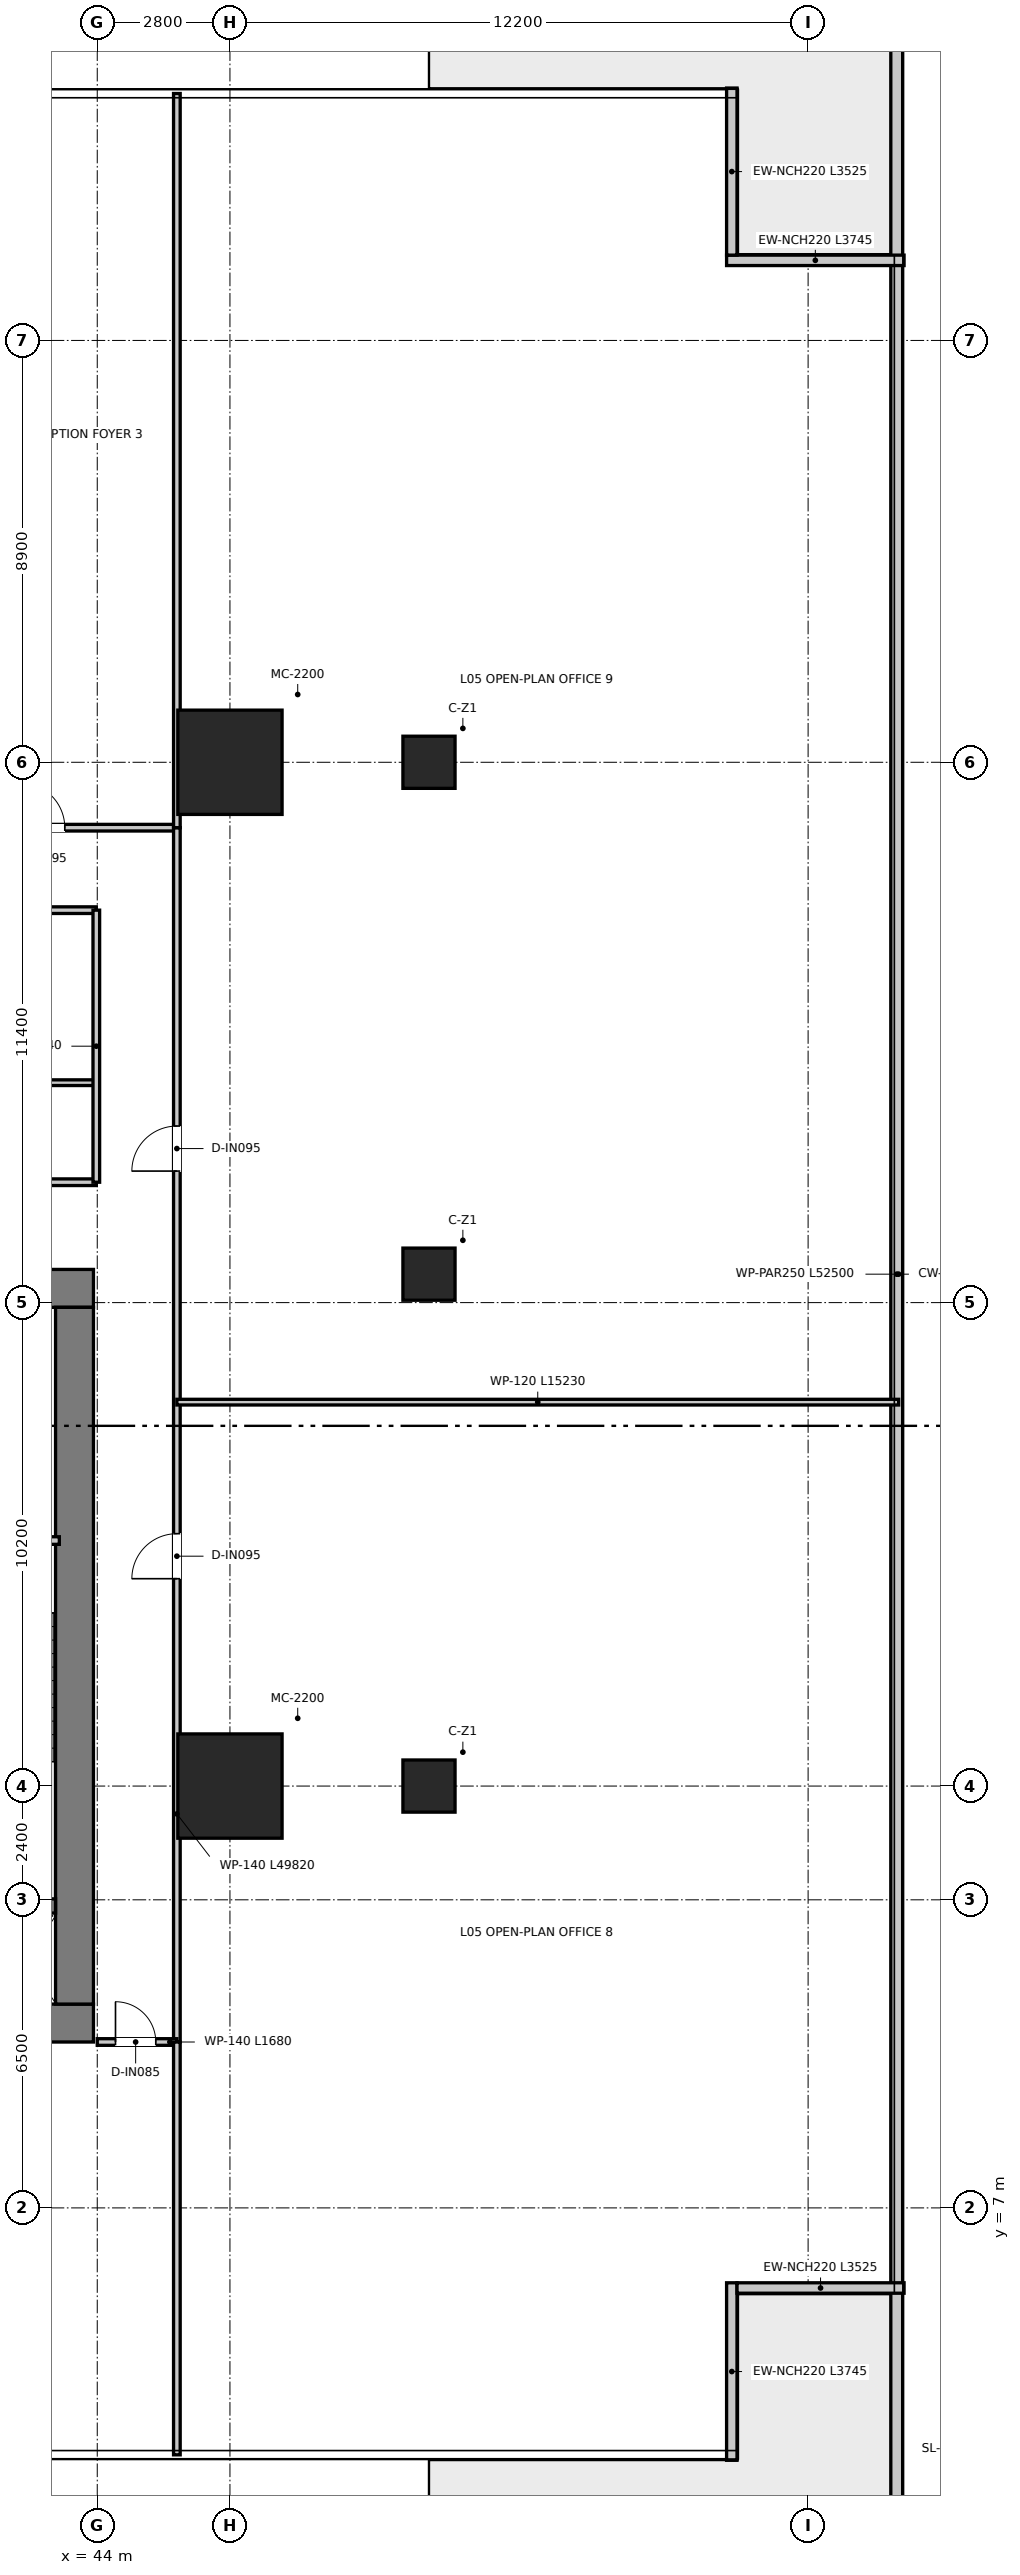
"""IFC4 building model, lengths in metres.
Left out: names, types, materials, properties, quantities, classifications, styles, units other than length and angle.
Written with IfcOpenShell. Run it as: python <this file> out.ifc"""

import sys

from ifc_helpers import new_model, si_unit, direction, frame, frame_2d, origin, origin_2d, place, context, subcontext, project, spatial, rectangle, extrude, source, transform, mapped, element, fill, save


model = new_model("IFC4")
c1 = context("Model", 3, precision=1e-05, world=origin(), true_north=direction((0.0, 1.0)))
c2 = subcontext(c1, "Body", "Model", "MODEL_VIEW")
j1 = project(units=[si_unit("LENGTHUNIT", "METRE"), si_unit("PLANEANGLEUNIT", "RADIAN")], contexts=[c1])
p1 = place(None, origin())
s1 = spatial("IfcSite", under=j1, at=p1, CompositionType="ELEMENT")
p2 = place(p1, origin())
s2 = spatial("IfcBuilding", under=s1, at=p2, CompositionType="ELEMENT")
p3 = place(p2, frame((0.0, 0.0, 25.0)))
s3 = spatial("IfcBuildingStorey", under=s2, at=p3, CompositionType="ELEMENT", Elevation=25.0)
p4 = place(p3, frame((28.08, 10.9, 0.0), z_axis=(0.0, 0.0, 1.0), x_axis=(1.0, 0.0, 0.0)))
e1 = element("IfcWall", 1, at=p4, inside=s3, PredefinedType="SHEAR", context=c2, shape_type="SweptSolid", body=[
    extrude(rectangle(XDim=15.84, YDim=0.8, at=frame_2d((7.92, 0.0))), origin(), (0.0, 0.0, 1.0), 3.95),
])
p5 = place(p3, frame((28.08, 26.4, 0.0), z_axis=(0.0, 0.0, 1.0), x_axis=(1.0, 0.0, 0.0)))
e2 = element("IfcWall", 2, at=p5, inside=s3, PredefinedType="SHEAR", context=c2, shape_type="SweptSolid", body=[
    extrude(rectangle(XDim=15.84, YDim=0.8, at=frame_2d((7.92, 0.0))), origin(), (0.0, 0.0, 1.0), 3.95),
])
p6 = place(p5, frame((7.22, 0.0, 0.0)))
e3 = element("IfcOpeningElement", 3, at=p6, cuts=e2, PredefinedType="OPENING", context=c2, shape_type="SweptSolid", body=[
    extrude(rectangle(XDim=1.4, YDim=2.2, at=frame_2d((0.7, 1.1))), frame((0.0, 0.41, 0.0), z_axis=(0.0, -1.0, 0.0), x_axis=(1.0, 0.0, 0.0)), (0.0, 0.0, 1.0), 0.82),
])
p7 = place(p5, frame((1.775, 0.0, 0.0)))
e4 = element("IfcOpeningElement", 4, at=p7, cuts=e2, PredefinedType="OPENING", context=c2, shape_type="SweptSolid", body=[
    extrude(rectangle(XDim=1.05, YDim=2.1, at=frame_2d((0.525, 1.05))), frame((0.0, 0.41, 0.0), z_axis=(0.0, -1.0, 0.0), x_axis=(1.0, 0.0, 0.0)), (0.0, 0.0, 1.0), 0.82),
])
p8 = place(p5, frame((13.015, 0.0, 0.0)))
e5 = element("IfcOpeningElement", 5, at=p8, cuts=e2, PredefinedType="OPENING", context=c2, shape_type="SweptSolid", body=[
    extrude(rectangle(XDim=1.05, YDim=2.1, at=frame_2d((0.525, 1.05))), frame((0.0, 0.41, 0.0), z_axis=(0.0, -1.0, 0.0), x_axis=(1.0, 0.0, 0.0)), (0.0, 0.0, 1.0), 0.82),
])
p9 = place(p3, frame((43.52, 11.3, 0.0), z_axis=(0.0, 0.0, 1.0), x_axis=(0.0, 1.0, 0.0)))
e6 = element("IfcWall", 6, at=p9, inside=s3, PredefinedType="SHEAR", context=c2, shape_type="SweptSolid", body=[
    extrude(rectangle(XDim=14.7, YDim=0.8, at=frame_2d((7.35, 0.0))), origin(), (0.0, 0.0, 1.0), 3.95),
])
p10 = place(p3, frame((40.02, 13.37, 0.0), z_axis=(0.0, 0.0, 1.0), x_axis=(1.0, 0.0, 0.0)))
e7 = element("IfcWall", 7, at=p10, inside=s3, PredefinedType="SHEAR", context=c2, shape_type="SweptSolid", body=[
    extrude(rectangle(XDim=3.1, YDim=0.3, at=frame_2d((1.55, 0.0))), origin(), (0.0, 0.0, 1.0), 3.95),
])
m1 = source(origin(), c2, "Body", "SweptSolid", [
    extrude(rectangle(XDim=2.2, YDim=2.2, at=origin_2d()), origin(), (0.0, 0.0, 1.0), 3.95),
])
for number, where, z_axis, x_axis in (
    (8, (46.8, 15.9, 0.0), (0.0, 0.0, 1.0), (1.0, 0.0, 0.0)),
    (9, (46.8, 37.5, 0.0), (0.0, 0.0, 1.0), (1.0, 0.0, 0.0)),
):
    element("IfcColumn", number, at=place(p3, frame(where, z_axis=z_axis, x_axis=x_axis)), inside=s3, PredefinedType="USERDEFINED", context=c2, shape_type="MappedRepresentation", body=[
        mapped(m1, transform((0.0, 0.0, 0.0), x_axis=(1.0, 0.0, 0.0), y_axis=(0.0, 1.0, 0.0), z_axis=(0.0, 0.0, 1.0), scale=1.0)),
    ])
m2 = source(origin(), c2, "Body", "SweptSolid", [
    extrude(rectangle(XDim=1.1, YDim=1.1, at=origin_2d()), origin(), (0.0, 0.0, 1.0), 3.95),
])
for number, where, z_axis, x_axis in (
    (10, (51.0, 37.5, 0.0), (0.0, 0.0, 1.0), (1.0, 0.0, 0.0)),
    (11, (51.0, 26.7, 0.0), (0.0, 0.0, 1.0), (1.0, 0.0, 0.0)),
    (12, (51.0, 15.9, 0.0), (0.0, 0.0, 1.0), (1.0, 0.0, 0.0)),
):
    element("IfcColumn", number, at=place(p3, frame(where, z_axis=z_axis, x_axis=x_axis)), inside=s3, PredefinedType="COLUMN", context=c2, shape_type="MappedRepresentation", body=[
        mapped(m2, transform((0.0, 0.0, 0.0), x_axis=(1.0, 0.0, 0.0), y_axis=(0.0, 1.0, 0.0), z_axis=(0.0, 0.0, 1.0), scale=1.0)),
    ])
p11 = place(p3, frame((60.87, 0.45, 0.0), z_axis=(0.0, 0.0, 1.0), x_axis=(0.0, 1.0, 0.0)))
e13 = element("IfcWall", 13, at=p11, inside=s3, PredefinedType="PARAPET", context=c2, shape_type="SweptSolid", body=[
    extrude(rectangle(XDim=52.5, YDim=0.25, at=frame_2d((26.25, 0.0))), origin(), (0.0, 0.0, 1.0), 1.2),
])
p12 = place(p3, frame((57.39, 1.675, 0.0), z_axis=(0.0, 0.0, 1.0), x_axis=(0.0, 1.0, 0.0)))
e14 = element("IfcWall", 14, at=p12, inside=s3, PredefinedType="ELEMENTEDWALL", context=c2, shape_type="SweptSolid", body=[
    extrude(rectangle(XDim=3.745, YDim=0.22, at=frame_2d((1.873, 0.0))), origin(), (0.0, 0.0, 1.0), 3.67),
])
p13 = place(p3, frame((57.5, 5.31, 0.0), z_axis=(0.0, 0.0, 1.0), x_axis=(1.0, 0.0, 0.0)))
e15 = element("IfcWall", 15, at=p13, inside=s3, PredefinedType="ELEMENTEDWALL", context=c2, shape_type="SweptSolid", body=[
    extrude(rectangle(XDim=3.525, YDim=0.22, at=frame_2d((1.762, 0.0))), origin(), (0.0, 0.0, 1.0), 3.67),
])
p14 = place(p3, frame((61.025, 48.09, 0.0), z_axis=(0.0, 0.0, 1.0), x_axis=(-1.0, 0.0, 0.0)))
e16 = element("IfcWall", 16, at=p14, inside=s3, PredefinedType="ELEMENTEDWALL", context=c2, shape_type="SweptSolid", body=[
    extrude(rectangle(XDim=3.745, YDim=0.22, at=frame_2d((1.873, 0.0))), origin(), (0.0, 0.0, 1.0), 3.67),
])
p15 = place(p3, frame((57.39, 48.2, 0.0), z_axis=(0.0, 0.0, 1.0), x_axis=(0.0, 1.0, 0.0)))
e17 = element("IfcWall", 17, at=p15, inside=s3, PredefinedType="ELEMENTEDWALL", context=c2, shape_type="SweptSolid", body=[
    extrude(rectangle(XDim=3.525, YDim=0.22, at=frame_2d((1.763, 0.0))), origin(), (0.0, 0.0, 1.0), 3.67),
])
p16 = place(p3, frame((40.04, 21.08, 0.0), z_axis=(0.0, 0.0, 1.0), x_axis=(1.0, 0.0, 0.0)))
e18 = element("IfcWall", 18, at=p16, inside=s3, PredefinedType="PARTITIONING", context=c2, shape_type="SweptSolid", body=[
    extrude(rectangle(XDim=3.16, YDim=0.16, at=frame_2d((1.58, 0.0))), origin(), (0.0, 0.0, 1.0), 3.67),
])
p17 = place(p16, frame((1.055, 0.0, 0.0)))
e19 = element("IfcOpeningElement", 19, at=p17, cuts=e18, PredefinedType="OPENING", context=c2, shape_type="SweptSolid", body=[
    extrude(rectangle(XDim=1.05, YDim=2.1, at=frame_2d((0.525, 1.05))), frame((0.0, 0.09, 0.0), z_axis=(0.0, -1.0, 0.0), x_axis=(1.0, 0.0, 0.0)), (0.0, 0.0, 1.0), 0.18),
])
p18 = place(p3, frame((28.02, 28.64, 0.0), z_axis=(0.0, 0.0, 1.0), x_axis=(1.0, 0.0, 0.0)))
e20 = element("IfcWall", 20, at=p18, inside=s3, PredefinedType="PARTITIONING", context=c2, shape_type="SweptSolid", body=[
    extrude(rectangle(XDim=15.96, YDim=0.14, at=frame_2d((7.98, 0.0))), origin(), (0.0, 0.0, 1.0), 3.08),
])
p19 = place(p18, frame((7.455, 0.0, 0.0)))
e21 = element("IfcOpeningElement", 21, at=p19, cuts=e20, PredefinedType="OPENING", context=c2, shape_type="SweptSolid", body=[
    extrude(rectangle(XDim=1.05, YDim=2.15, at=frame_2d((0.525, 1.075))), frame((0.0, 0.08, 0.0), z_axis=(0.0, -1.0, 0.0), x_axis=(1.0, 0.0, 0.0)), (0.0, 0.0, 1.0), 0.16),
])
p20 = place(p3, frame((28.02, 30.74, 0.0), z_axis=(0.0, 0.0, 1.0), x_axis=(1.0, 0.0, 0.0)))
e22 = element("IfcWall", 22, at=p20, inside=s3, PredefinedType="PARTITIONING", context=c2, shape_type="SweptSolid", body=[
    extrude(rectangle(XDim=15.96, YDim=0.12, at=frame_2d((7.98, 0.0))), origin(), (0.0, 0.0, 1.0), 3.08),
])
p21 = place(p3, frame((28.02, 34.38, 0.0), z_axis=(0.0, 0.0, 1.0), x_axis=(1.0, 0.0, 0.0)))
e23 = element("IfcWall", 23, at=p21, inside=s3, PredefinedType="PARTITIONING", context=c2, shape_type="SweptSolid", body=[
    extrude(rectangle(XDim=15.96, YDim=0.14, at=frame_2d((7.98, 0.0))), origin(), (0.0, 0.0, 1.0), 3.08),
])
p22 = place(p21, frame((1.13, 0.0, 0.0)))
e24 = element("IfcOpeningElement", 24, at=p22, cuts=e23, PredefinedType="OPENING", context=c2, shape_type="SweptSolid", body=[
    extrude(rectangle(XDim=0.9, YDim=2.1, at=frame_2d((0.45, 1.05))), frame((0.0, 0.08, 0.0), z_axis=(0.0, -1.0, 0.0), x_axis=(1.0, 0.0, 0.0)), (0.0, 0.0, 1.0), 0.16),
])
p23 = place(p21, frame((4.33, 0.0, 0.0)))
e25 = element("IfcOpeningElement", 25, at=p23, cuts=e23, PredefinedType="OPENING", context=c2, shape_type="SweptSolid", body=[
    extrude(rectangle(XDim=0.9, YDim=2.1, at=frame_2d((0.45, 1.05))), frame((0.0, 0.08, 0.0), z_axis=(0.0, -1.0, 0.0), x_axis=(1.0, 0.0, 0.0)), (0.0, 0.0, 1.0), 0.16),
])
p24 = place(p21, frame((7.355, 0.0, 0.0)))
e26 = element("IfcOpeningElement", 26, at=p24, cuts=e23, PredefinedType="OPENING", context=c2, shape_type="SweptSolid", body=[
    extrude(rectangle(XDim=0.95, YDim=2.1, at=frame_2d((0.475, 1.05))), frame((0.0, 0.08, 0.0), z_axis=(0.0, -1.0, 0.0), x_axis=(1.0, 0.0, 0.0)), (0.0, 0.0, 1.0), 0.16),
])
p25 = place(p21, frame((12.23, 0.0, 0.0)))
e27 = element("IfcOpeningElement", 27, at=p25, cuts=e23, PredefinedType="OPENING", context=c2, shape_type="SweptSolid", body=[
    extrude(rectangle(XDim=0.95, YDim=2.1, at=frame_2d((0.475, 1.05))), frame((0.0, 0.08, 0.0), z_axis=(0.0, -1.0, 0.0), x_axis=(1.0, 0.0, 0.0)), (0.0, 0.0, 1.0), 0.16),
])
p26 = place(p3, frame((43.98, 28.64, 0.0), z_axis=(0.0, 0.0, 1.0), x_axis=(0.0, 1.0, 0.0)))
e28 = element("IfcWall", 28, at=p26, inside=s3, PredefinedType="PARTITIONING", context=c2, shape_type="SweptSolid", body=[
    extrude(rectangle(XDim=5.74, YDim=0.14, at=frame_2d((2.87, 0.0))), origin(), (0.0, 0.0, 1.0), 3.22),
])
p27 = place(p3, frame((26.32, 36.12, 0.0), z_axis=(0.0, 0.0, 1.0), x_axis=(1.0, 0.0, 0.0)))
e29 = element("IfcWall", 29, at=p27, inside=s3, PredefinedType="PARTITIONING", context=c2, shape_type="SweptSolid", body=[
    extrude(rectangle(XDim=19.36, YDim=0.14, at=frame_2d((9.68, 0.0))), origin(), (0.0, 0.0, 1.0), 3.08),
])
p28 = place(p27, frame((2.365, 0.0, 0.0)))
e30 = element("IfcOpeningElement", 30, at=p28, cuts=e29, PredefinedType="OPENING", context=c2, shape_type="SweptSolid", body=[
    extrude(rectangle(XDim=0.95, YDim=2.1, at=frame_2d((0.475, 1.05))), frame((0.0, 0.08, 0.0), z_axis=(0.0, -1.0, 0.0), x_axis=(1.0, 0.0, 0.0)), (0.0, 0.0, 1.0), 0.16),
])
p29 = place(p27, frame((9.205, 0.0, 0.0)))
e31 = element("IfcOpeningElement", 31, at=p29, cuts=e29, PredefinedType="OPENING", context=c2, shape_type="SweptSolid", body=[
    extrude(rectangle(XDim=0.95, YDim=2.1, at=frame_2d((0.475, 1.05))), frame((0.0, 0.08, 0.0), z_axis=(0.0, -1.0, 0.0), x_axis=(1.0, 0.0, 0.0)), (0.0, 0.0, 1.0), 0.16),
])
p30 = place(p27, frame((16.045, 0.0, 0.0)))
e32 = element("IfcOpeningElement", 32, at=p30, cuts=e29, PredefinedType="OPENING", context=c2, shape_type="SweptSolid", body=[
    extrude(rectangle(XDim=0.95, YDim=2.1, at=frame_2d((0.475, 1.05))), frame((0.0, 0.08, 0.0), z_axis=(0.0, -1.0, 0.0), x_axis=(1.0, 0.0, 0.0)), (0.0, 0.0, 1.0), 0.16),
])
p31 = place(p3, frame((45.68, 10.5, 0.0), z_axis=(0.0, 0.0, 1.0), x_axis=(0.0, 1.0, 0.0)))
e33 = element("IfcWall", 33, at=p31, inside=s3, PredefinedType="PARTITIONING", context=c2, shape_type="SweptSolid", body=[
    extrude(rectangle(XDim=25.62, YDim=0.14, at=frame_2d((12.81, 0.0))), origin(), (0.0, 0.0, 1.0), 2.97),
])
p32 = place(p31, frame((9.775, 0.0, 0.0)))
e34 = element("IfcOpeningElement", 34, at=p32, cuts=e33, PredefinedType="OPENING", context=c2, shape_type="SweptSolid", body=[
    extrude(rectangle(XDim=0.95, YDim=2.1, at=frame_2d((0.475, 1.05))), frame((0.0, 0.08, 0.0), z_axis=(0.0, -1.0, 0.0), x_axis=(1.0, 0.0, 0.0)), (0.0, 0.0, 1.0), 0.16),
])
p33 = place(p31, frame((18.375, 0.0, 0.0)))
e35 = element("IfcOpeningElement", 35, at=p33, cuts=e33, PredefinedType="OPENING", context=c2, shape_type="SweptSolid", body=[
    extrude(rectangle(XDim=0.95, YDim=2.1, at=frame_2d((0.475, 1.05))), frame((0.0, 0.08, 0.0), z_axis=(0.0, -1.0, 0.0), x_axis=(1.0, 0.0, 0.0)), (0.0, 0.0, 1.0), 0.16),
])
p34 = place(p3, frame((44.0, 10.5, 0.0), z_axis=(0.0, 0.0, 1.0), x_axis=(1.0, 0.0, 0.0)))
e36 = element("IfcWall", 36, at=p34, inside=s3, PredefinedType="PARTITIONING", context=c2, shape_type="SweptSolid", body=[
    extrude(rectangle(XDim=1.68, YDim=0.14, at=frame_2d((0.84, 0.0))), origin(), (0.0, 0.0, 1.0), 3.67),
])
p35 = place(p34, frame((0.385, 0.0, 0.0)))
e37 = element("IfcOpeningElement", 37, at=p35, cuts=e36, PredefinedType="OPENING", context=c2, shape_type="SweptSolid", body=[
    extrude(rectangle(XDim=0.85, YDim=2.1, at=frame_2d((0.425, 1.05))), frame((0.0, 0.08, 0.0), z_axis=(0.0, -1.0, 0.0), x_axis=(1.0, 0.0, 0.0)), (0.0, 0.0, 1.0), 0.16),
])
p36 = place(p3, frame((45.68, 36.12, 0.0), z_axis=(0.0, 0.0, 1.0), x_axis=(0.0, 1.0, 0.0)))
e38 = element("IfcWall", 38, at=p36, inside=s3, PredefinedType="PARTITIONING", context=c2, shape_type="SweptSolid", body=[
    extrude(rectangle(XDim=15.49, YDim=0.14, at=frame_2d((7.745, 0.0))), origin(), (0.0, 0.0, 1.0), 2.97),
])
p37 = place(p3, frame((45.68, 1.79, 0.0), z_axis=(0.0, 0.0, 1.0), x_axis=(0.0, 1.0, 0.0)))
e39 = element("IfcWall", 39, at=p37, inside=s3, PredefinedType="PARTITIONING", context=c2, shape_type="SweptSolid", body=[
    extrude(rectangle(XDim=8.71, YDim=0.14, at=frame_2d((4.355, 0.0))), origin(), (0.0, 0.0, 1.0), 3.67),
])
p38 = place(p3, frame((45.68, 24.0, 0.0), z_axis=(0.0, 0.0, 1.0), x_axis=(1.0, 0.0, 0.0)))
e40 = element("IfcWall", 40, at=p38, inside=s3, PredefinedType="PARTITIONING", context=c2, shape_type="SweptSolid", body=[
    extrude(rectangle(XDim=15.23, YDim=0.12, at=frame_2d((7.615, 0.0))), origin(), (0.0, 0.0, 1.0), 2.97),
])
p39 = place(p30, origin())
e41 = element("IfcDoor", 41, at=p39, inside=s3, OperationType="SINGLE_SWING_LEFT", PredefinedType="DOOR", context=c2, shape_type="SweptSolid", body=[
    extrude(rectangle(XDim=0.95, YDim=2.1, at=frame_2d((0.475, 1.05))), frame((0.0, 0.025, 0.0), z_axis=(0.0, -1.0, 0.0), x_axis=(1.0, 0.0, 0.0)), (0.0, 0.0, 1.0), 0.05),
])
fill(e32, e41)
p40 = place(p32, origin())
e42 = element("IfcDoor", 42, at=p40, inside=s3, OperationType="SINGLE_SWING_LEFT", PredefinedType="DOOR", context=c2, shape_type="SweptSolid", body=[
    extrude(rectangle(XDim=0.95, YDim=2.1, at=frame_2d((0.475, 1.05))), frame((0.0, 0.025, 0.0), z_axis=(0.0, -1.0, 0.0), x_axis=(1.0, 0.0, 0.0)), (0.0, 0.0, 1.0), 0.05),
])
fill(e34, e42)
p41 = place(p33, origin())
e43 = element("IfcDoor", 43, at=p41, inside=s3, OperationType="SINGLE_SWING_LEFT", PredefinedType="DOOR", context=c2, shape_type="SweptSolid", body=[
    extrude(rectangle(XDim=0.95, YDim=2.1, at=frame_2d((0.475, 1.05))), frame((0.0, 0.025, 0.0), z_axis=(0.0, -1.0, 0.0), x_axis=(1.0, 0.0, 0.0)), (0.0, 0.0, 1.0), 0.05),
])
fill(e35, e43)
p42 = place(p35, origin())
e44 = element("IfcDoor", 44, at=p42, inside=s3, OperationType="SINGLE_SWING_LEFT", PredefinedType="DOOR", context=c2, shape_type="SweptSolid", body=[
    extrude(rectangle(XDim=0.85, YDim=2.1, at=frame_2d((0.425, 1.05))), frame((0.0, 0.025, 0.0), z_axis=(0.0, -1.0, 0.0), x_axis=(1.0, 0.0, 0.0)), (0.0, 0.0, 1.0), 0.05),
])
fill(e37, e44)
save(model, sys.argv[1])
